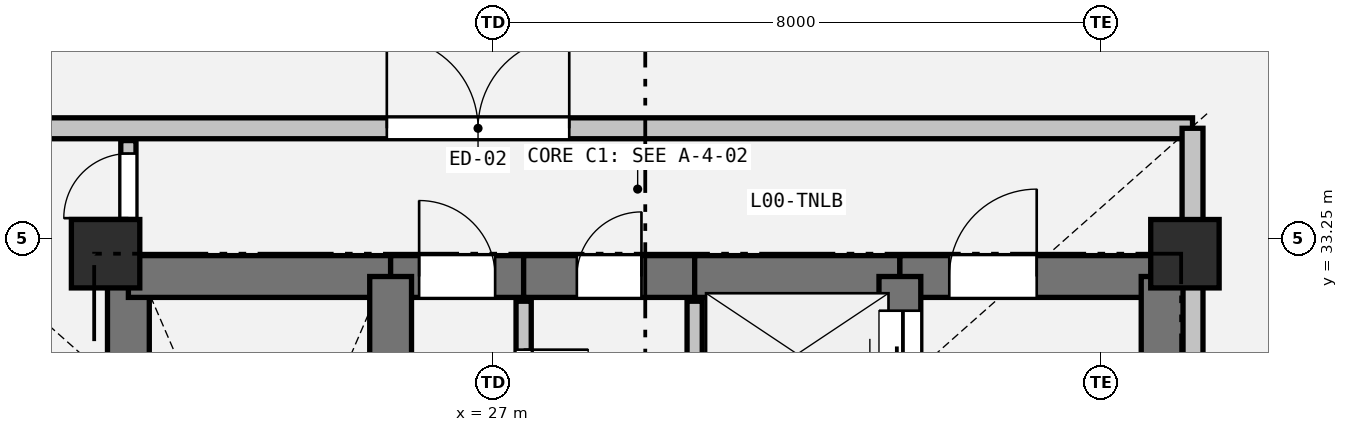
"""IFC4 building model, lengths in metres.
Left out: names, types, materials, properties, quantities, classifications, styles, units other than length and angle.
Written with IfcOpenShell. Run it as: python <this file> out.ifc"""

import sys

from ifc_helpers import new_model, si_unit, direction, frame, frame_2d, origin, origin_2d, place, context, subcontext, project, spatial, rectangle, extrude, element, fill, save


model = new_model("IFC4")
c1 = context("Model", 3, precision=1e-05, world=origin(), true_north=direction((0.0, 1.0)))
c2 = subcontext(c1, "Body", "Model", "MODEL_VIEW")
j1 = project(units=[si_unit("LENGTHUNIT", "METRE"), si_unit("PLANEANGLEUNIT", "RADIAN")], contexts=[c1])
p1 = place(None, origin())
s1 = spatial("IfcSite", under=j1, at=p1, CompositionType="ELEMENT")
p2 = place(p1, origin())
s2 = spatial("IfcBuilding", under=s1, at=p2, CompositionType="ELEMENT")
p3 = place(p2, origin())
s3 = spatial("IfcBuildingStorey", under=s2, at=p3, CompositionType="ELEMENT", Elevation=0.0)
for number, where, z_axis, x_axis in (
    (1, (21.9, 33.05, 0.0), (0.0, 0.0, 1.0), (1.0, 0.0, 0.0)),
    (2, (36.1, 33.05, 0.0), (0.0, 0.0, 1.0), (1.0, 0.0, 0.0)),
):
    element("IfcColumn", number, at=place(p3, frame(where, z_axis=z_axis, x_axis=x_axis)), inside=s3, PredefinedType="COLUMN", context=c2, shape_type="SweptSolid", body=[
        extrude(rectangle(XDim=0.9, YDim=0.9, at=origin_2d()), origin(), (0.0, 0.0, 1.0), 5.1),
    ])
p4 = place(p3, frame((18.2, 34.7, 0.0), z_axis=(0.0, 0.0, 1.0), x_axis=(1.0, 0.0, 0.0)))
e3 = element("IfcWall", 3, at=p4, inside=s3, PredefinedType="SOLIDWALL", context=c2, shape_type="SweptSolid", body=[
    extrude(rectangle(XDim=18.0, YDim=0.275, at=frame_2d((9.0, 0.0))), origin(), (0.0, 0.0, 1.0), 3.185),
])
p5 = place(p4, frame((7.4, 0.0, 0.0)))
e4 = element("IfcOpeningElement", 4, at=p5, cuts=e3, PredefinedType="OPENING", context=c2, shape_type="SweptSolid", body=[
    extrude(rectangle(XDim=2.4, YDim=2.4, at=frame_2d((1.2, 1.2))), frame((0.0, 0.147, 0.0), z_axis=(0.0, -1.0, 0.0), x_axis=(1.0, 0.0, 0.0)), (0.0, 0.0, 1.0), 0.295),
])
p6 = place(p3, frame((36.2, 34.7, 0.0), z_axis=(0.0, 0.0, 1.0), x_axis=(0.0, -1.0, 0.0)))
e5 = element("IfcWall", 5, at=p6, inside=s3, PredefinedType="SOLIDWALL", context=c2, shape_type="SweptSolid", body=[
    extrude(rectangle(XDim=15.9, YDim=0.275, at=frame_2d((7.95, 0.0))), origin(), (0.0, 0.0, 1.0), 3.185),
])
p7 = place(p3, frame((22.2, 25.4, 0.0), z_axis=(0.0, 0.0, 1.0), x_axis=(0.0, 1.0, 0.0)))
e6 = element("IfcWall", 6, at=p7, inside=s3, PredefinedType="SHEAR", context=c2, shape_type="SweptSolid", body=[
    extrude(rectangle(XDim=7.35, YDim=0.55, at=frame_2d((3.675, 0.0))), origin(), (0.0, 0.0, 1.0), 4.8),
])
p8 = place(p3, frame((22.2, 32.75, 0.0), z_axis=(0.0, 0.0, 1.0), x_axis=(1.0, 0.0, 0.0)))
e7 = element("IfcWall", 7, at=p8, inside=s3, PredefinedType="SHEAR", context=c2, shape_type="SweptSolid", body=[
    extrude(rectangle(XDim=3.45, YDim=0.55, at=frame_2d((1.725, 0.0))), origin(), (0.0, 0.0, 1.0), 4.8),
])
p9 = place(p3, frame((25.65, 32.75, 0.0), z_axis=(0.0, 0.0, 1.0), x_axis=(1.0, 0.0, 0.0)))
e8 = element("IfcWall", 8, at=p9, inside=s3, PredefinedType="SHEAR", context=c2, shape_type="SweptSolid", body=[
    extrude(rectangle(XDim=1.75, YDim=0.55, at=frame_2d((0.875, 0.0))), origin(), (0.0, 0.0, 1.0), 4.8),
])
p10 = place(p9, frame((0.375, 0.0, 0.0)))
e9 = element("IfcOpeningElement", 9, at=p10, cuts=e8, PredefinedType="OPENING", context=c2, shape_type="SweptSolid", body=[
    extrude(rectangle(XDim=1.0, YDim=2.15, at=frame_2d((0.5, 1.075))), frame((0.0, 0.285, 0.0), z_axis=(0.0, -1.0, 0.0), x_axis=(1.0, 0.0, 0.0)), (0.0, 0.0, 1.0), 0.57),
])
p11 = place(p3, frame((27.4, 32.75, 0.0), z_axis=(0.0, 0.0, 1.0), x_axis=(1.0, 0.0, 0.0)))
e10 = element("IfcWall", 10, at=p11, inside=s3, PredefinedType="SHEAR", context=c2, shape_type="SweptSolid", body=[
    extrude(rectangle(XDim=2.25, YDim=0.55, at=frame_2d((1.125, 0.0))), origin(), (0.0, 0.0, 1.0), 4.8),
])
p12 = place(p11, frame((0.7, 0.0, 0.0)))
e11 = element("IfcOpeningElement", 11, at=p12, cuts=e10, PredefinedType="OPENING", context=c2, shape_type="SweptSolid", body=[
    extrude(rectangle(XDim=0.85, YDim=2.1, at=frame_2d((0.425, 1.05))), frame((0.0, 0.285, 0.0), z_axis=(0.0, -1.0, 0.0), x_axis=(1.0, 0.0, 0.0)), (0.0, 0.0, 1.0), 0.57),
])
p13 = place(p3, frame((29.65, 32.75, 0.0), z_axis=(0.0, 0.0, 1.0), x_axis=(1.0, 0.0, 0.0)))
e12 = element("IfcWall", 12, at=p13, inside=s3, PredefinedType="SHEAR", context=c2, shape_type="SweptSolid", body=[
    extrude(rectangle(XDim=2.7, YDim=0.55, at=frame_2d((1.35, 0.0))), origin(), (0.0, 0.0, 1.0), 4.8),
])
p14 = place(p3, frame((32.35, 32.75, 0.0), z_axis=(0.0, 0.0, 1.0), x_axis=(1.0, 0.0, 0.0)))
e13 = element("IfcWall", 13, at=p14, inside=s3, PredefinedType="SHEAR", context=c2, shape_type="SweptSolid", body=[
    extrude(rectangle(XDim=3.45, YDim=0.55, at=frame_2d((1.725, 0.0))), origin(), (0.0, 0.0, 1.0), 4.8),
])
p15 = place(p14, frame((0.65, 0.0, 0.0)))
e14 = element("IfcOpeningElement", 14, at=p15, cuts=e13, PredefinedType="OPENING", context=c2, shape_type="SweptSolid", body=[
    extrude(rectangle(XDim=1.15, YDim=2.15, at=frame_2d((0.575, 1.075))), frame((0.0, 0.285, 0.0), z_axis=(0.0, -1.0, 0.0), x_axis=(1.0, 0.0, 0.0)), (0.0, 0.0, 1.0), 0.57),
])
p16 = place(p3, frame((35.8, 32.75, 0.0), z_axis=(0.0, 0.0, 1.0), x_axis=(0.0, -1.0, 0.0)))
e15 = element("IfcWall", 15, at=p16, inside=s3, PredefinedType="SHEAR", context=c2, shape_type="SweptSolid", body=[
    extrude(rectangle(XDim=4.65, YDim=0.55, at=frame_2d((2.325, 0.0))), origin(), (0.0, 0.0, 1.0), 4.8),
])
p17 = place(p3, frame((25.65, 27.95, 0.0), z_axis=(0.0, 0.0, 1.0), x_axis=(0.0, 1.0, 0.0)))
e16 = element("IfcWall", 16, at=p17, inside=s3, PredefinedType="SHEAR", context=c2, shape_type="SweptSolid", body=[
    extrude(rectangle(XDim=4.8, YDim=0.55, at=frame_2d((2.4, 0.0))), origin(), (0.0, 0.0, 1.0), 4.8),
])
p18 = place(p3, frame((32.35, 30.75, 0.0), z_axis=(0.0, 0.0, 1.0), x_axis=(0.0, 1.0, 0.0)))
e17 = element("IfcWall", 17, at=p18, inside=s3, PredefinedType="SHEAR", context=c2, shape_type="SweptSolid", body=[
    extrude(rectangle(XDim=2.0, YDim=0.55, at=frame_2d((1.0, 0.0))), origin(), (0.0, 0.0, 1.0), 4.8),
])
p19 = place(p18, frame((0.45, 0.0, 0.0)))
e18 = element("IfcOpeningElement", 18, at=p19, cuts=e17, PredefinedType="OPENING", context=c2, shape_type="SweptSolid", body=[
    extrude(rectangle(XDim=1.1, YDim=2.15, at=frame_2d((0.55, 1.075))), frame((0.0, 0.285, 0.0), z_axis=(0.0, -1.0, 0.0), x_axis=(1.0, 0.0, 0.0)), (0.0, 0.0, 1.0), 0.57),
])
p20 = place(p3, frame((29.65, 30.3, 0.0), z_axis=(0.0, 0.0, 1.0), x_axis=(0.0, 1.0, 0.0)))
e19 = element("IfcWall", 19, at=p20, inside=s3, PredefinedType="PARTITIONING", context=c2, shape_type="SweptSolid", body=[
    extrude(rectangle(XDim=2.125, YDim=0.2, at=frame_2d((1.062, 0.0))), origin(), (0.0, 0.0, 1.0), 4.8),
])
p21 = place(p3, frame((27.4, 32.425, 0.0), z_axis=(0.0, 0.0, 1.0), x_axis=(0.0, -1.0, 0.0)))
e20 = element("IfcWall", 20, at=p21, inside=s3, PredefinedType="PARTITIONING", context=c2, shape_type="SweptSolid", body=[
    extrude(rectangle(XDim=2.125, YDim=0.2, at=frame_2d((1.062, 0.0))), origin(), (0.0, 0.0, 1.0), 4.8),
])
p22 = place(p21, frame((0.637, 0.0, 0.0)))
e21 = element("IfcOpeningElement", 21, at=p22, cuts=e20, PredefinedType="OPENING", context=c2, shape_type="SweptSolid", body=[
    extrude(rectangle(XDim=0.85, YDim=2.1, at=frame_2d((0.425, 1.05))), frame((0.0, 0.11, 0.0), z_axis=(0.0, -1.0, 0.0), x_axis=(1.0, 0.0, 0.0)), (0.0, 0.0, 1.0), 0.22),
])
p23 = place(p3, frame((22.2, 33.075, 0.0), z_axis=(0.0, 0.0, 1.0), x_axis=(0.0, 1.0, 0.0)))
e22 = element("IfcWall", 22, at=p23, inside=s3, PredefinedType="PARTITIONING", context=c2, shape_type="SweptSolid", body=[
    extrude(rectangle(XDim=1.464, YDim=0.2, at=frame_2d((0.732, 0.0))), origin(), (0.0, 0.0, 1.0), 4.8),
])
p24 = place(p23, frame((0.443, 0.0, 0.0)))
e23 = element("IfcOpeningElement", 23, at=p24, cuts=e22, PredefinedType="OPENING", context=c2, shape_type="SweptSolid", body=[
    extrude(rectangle(XDim=0.85, YDim=2.1, at=frame_2d((0.425, 1.05))), frame((0.0, 0.11, 0.0), z_axis=(0.0, -1.0, 0.0), x_axis=(1.0, 0.0, 0.0)), (0.0, 0.0, 1.0), 0.22),
])
p25 = place(p5, origin())
e24 = element("IfcDoor", 24, at=p25, inside=s3, OperationType="DOUBLE_DOOR_SINGLE_SWING", PredefinedType="DOOR", context=c2, shape_type="SweptSolid", body=[
    extrude(rectangle(XDim=2.4, YDim=2.4, at=frame_2d((1.2, 1.2))), frame((0.0, 0.025, 0.0), z_axis=(0.0, -1.0, 0.0), x_axis=(1.0, 0.0, 0.0)), (0.0, 0.0, 1.0), 0.05),
])
fill(e4, e24)
p26 = place(p10, origin())
e25 = element("IfcDoor", 25, at=p26, inside=s3, OperationType="SINGLE_SWING_LEFT", PredefinedType="DOOR", context=c2, shape_type="SweptSolid", body=[
    extrude(rectangle(XDim=1.0, YDim=2.15, at=frame_2d((0.5, 1.075))), frame((0.0, 0.025, 0.0), z_axis=(0.0, -1.0, 0.0), x_axis=(1.0, 0.0, 0.0)), (0.0, 0.0, 1.0), 0.05),
])
fill(e9, e25)
p27 = place(p19, origin())
e26 = element("IfcDoor", 26, at=p27, inside=s3, OperationType="SLIDING_TO_LEFT", PredefinedType="DOOR", context=c2, shape_type="SweptSolid", body=[
    extrude(rectangle(XDim=1.1, YDim=2.15, at=frame_2d((0.55, 1.075))), frame((0.0, 0.025, 0.0), z_axis=(0.0, -1.0, 0.0), x_axis=(1.0, 0.0, 0.0)), (0.0, 0.0, 1.0), 0.05),
])
fill(e18, e26)
p28 = place(p15, origin())
e27 = element("IfcDoor", 27, at=p28, inside=s3, OperationType="SINGLE_SWING_RIGHT", PredefinedType="DOOR", context=c2, shape_type="SweptSolid", body=[
    extrude(rectangle(XDim=1.15, YDim=2.15, at=frame_2d((0.575, 1.075))), frame((0.0, 0.025, 0.0), z_axis=(0.0, -1.0, 0.0), x_axis=(1.0, 0.0, 0.0)), (0.0, 0.0, 1.0), 0.05),
])
fill(e14, e27)
p29 = place(p22, origin())
e28 = element("IfcDoor", 28, at=p29, inside=s3, OperationType="SINGLE_SWING_LEFT", PredefinedType="DOOR", context=c2, shape_type="SweptSolid", body=[
    extrude(rectangle(XDim=0.85, YDim=2.1, at=frame_2d((0.425, 1.05))), frame((0.0, 0.025, 0.0), z_axis=(0.0, -1.0, 0.0), x_axis=(1.0, 0.0, 0.0)), (0.0, 0.0, 1.0), 0.05),
])
fill(e21, e28)
p30 = place(p12, origin())
e29 = element("IfcDoor", 29, at=p30, inside=s3, OperationType="SINGLE_SWING_RIGHT", PredefinedType="DOOR", context=c2, shape_type="SweptSolid", body=[
    extrude(rectangle(XDim=0.85, YDim=2.1, at=frame_2d((0.425, 1.05))), frame((0.0, 0.025, 0.0), z_axis=(0.0, -1.0, 0.0), x_axis=(1.0, 0.0, 0.0)), (0.0, 0.0, 1.0), 0.05),
])
fill(e11, e29)
p31 = place(p24, origin())
e30 = element("IfcDoor", 30, at=p31, inside=s3, OperationType="SINGLE_SWING_LEFT", PredefinedType="DOOR", context=c2, shape_type="SweptSolid", body=[
    extrude(rectangle(XDim=0.85, YDim=2.1, at=frame_2d((0.425, 1.05))), frame((0.0, 0.025, 0.0), z_axis=(0.0, -1.0, 0.0), x_axis=(1.0, 0.0, 0.0)), (0.0, 0.0, 1.0), 0.05),
])
fill(e23, e30)
save(model, sys.argv[1])
